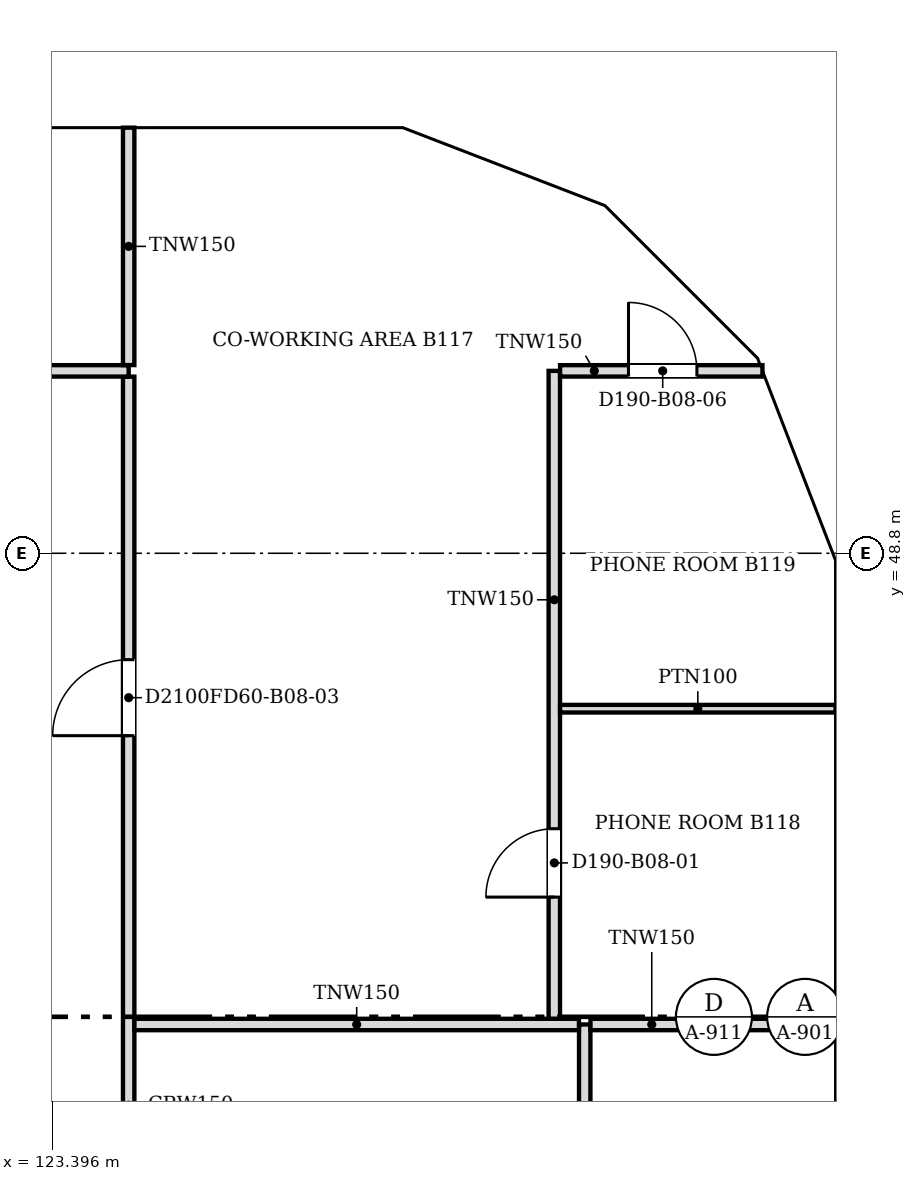
"""IFC4 building model, lengths in metres.
Left out: names, types, materials, properties, quantities, classifications, styles, units other than length and angle.
Written with IfcOpenShell. Run it as: python <this file> out.ifc"""

import sys

from ifc_helpers import new_model, si_unit, direction, frame, frame_2d, origin, place, context, subcontext, project, spatial, polyline, rectangle, outline, extrude, faceted_brep, source, transform, mapped, element, fill, save


model = new_model("IFC4")
c1 = context("Model", 3, precision=1e-05, world=origin(), true_north=direction((0.0, 1.0)))
c2 = subcontext(c1, "Body", "Model", "MODEL_VIEW")
j1 = project(units=[si_unit("LENGTHUNIT", "METRE"), si_unit("PLANEANGLEUNIT", "RADIAN")], contexts=[c1])
p1 = place(None, origin())
s1 = spatial("IfcSite", under=j1, at=p1, CompositionType="ELEMENT")
p2 = place(p1, origin())
s2 = spatial("IfcBuilding", under=s1, at=p2, CompositionType="ELEMENT")
p3 = place(p2, frame((0.0, 0.0, 80.0)))
s3 = spatial("IfcBuildingStorey", under=s2, at=p3, CompositionType="ELEMENT", Elevation=80.0)
m1 = source(origin(), c2, "Body", "SweptSolid", [
    extrude(outline(polyline([(3.05, 0.0), (6.1, 3.8), (3.05, 7.6), (0.0, 3.8), (3.05, 0.0)])), frame((0.0, 0.25, 0.0), z_axis=(0.0, -1.0, 0.0), x_axis=(1.0, 0.0, 0.0)), (0.0, 0.0, 1.0), 0.5),
])
p4 = place(p3, frame((133.95, 39.65, -3.8), z_axis=(0.0, 0.0, 1.0), x_axis=(0.0, 1.0, 0.0)))
e1 = element("IfcWall", 1, at=p4, inside=s3, PredefinedType="SOLIDWALL", context=c2, shape_type="MappedRepresentation", body=[
    mapped(m1, transform((0.0, 0.0, 0.0), scale=1.0)),
])
m2 = source(origin(), c2, "Body", "SweptSolid", [
    extrude(outline(polyline([(3.05, 0.399), (5.78, 3.8), (3.05, 7.201), (0.321, 3.8), (3.05, 0.399)])), frame((0.0, 0.26, 0.0), z_axis=(0.0, -1.0, 0.0), x_axis=(1.0, 0.0, 0.0)), (0.0, 0.0, 1.0), 0.52),
])
p5 = place(p4, origin())
e2 = element("IfcOpeningElement", 2, at=p5, cuts=e1, PredefinedType="OPENING", context=c2, shape_type="MappedRepresentation", body=[
    mapped(m2, transform((0.0, 0.0, 0.0), scale=1.0)),
])
m3 = source(origin(), c2, "Body", "Brep", [
    faceted_brep([(3.003, -0.25, 0.0), (3.05, -0.25, 0.06), (3.05, -0.25, 7.54), (3.003, -0.25, 7.6), (0.0, -0.25, 3.8), (0.0, 0.25, 3.8), (2.957, 0.25, 7.541), (2.957, 0.25, 0.059), (3.003, 0.0, 0.0), (3.003, 0.0, 7.6)], [[[0, 1, 2, 3, 4]], [[5, 6, 7]], [[1, 0, 8]], [[9, 3, 2]], [[6, 5, 4, 3, 9]], [[5, 7, 8, 0, 4]], [[1, 8, 7, 6, 9, 2]]]),
])
p6 = place(p3, frame((133.95, 45.75, -3.8), z_axis=(0.0, 0.0, 1.0), x_axis=(0.0, 1.0, 0.0)))
e3 = element("IfcWall", 3, at=p6, inside=s3, PredefinedType="SOLIDWALL", context=c2, shape_type="MappedRepresentation", body=[
    mapped(m3, transform((0.0, 0.0, 0.0), scale=1.0)),
])
m4 = source(origin(), c2, "Body", "SweptSolid", [
    extrude(outline(polyline([(2.803, 6.944), (0.319, 3.8), (2.803, 0.656), (2.803, 6.944)])), frame((0.0, 0.26, 0.0), z_axis=(0.0, -1.0, 0.0), x_axis=(1.0, 0.0, 0.0)), (0.0, 0.0, 1.0), 0.52),
])
p7 = place(p6, origin())
e4 = element("IfcOpeningElement", 4, at=p7, cuts=e3, PredefinedType="OPENING", context=c2, shape_type="MappedRepresentation", body=[
    mapped(m4, transform((0.0, 0.0, 0.0), scale=1.0)),
])
m5 = source(origin(), c2, "Body", "Brep", [
    faceted_brep([(0.047, -0.25, 0.0), (2.997, -0.25, 3.8), (0.047, -0.25, 7.6), (0.0, -0.25, 7.541), (0.0, -0.25, 0.059), (0.093, 0.25, 7.54), (2.944, 0.25, 3.868), (2.944, 0.25, 3.732), (0.093, 0.25, 0.06), (2.997, 0.0, 3.8), (0.047, 0.0, 0.0), (0.047, 0.0, 7.6)], [[[0, 1, 2, 3, 4]], [[5, 6, 7, 8]], [[8, 7, 9, 1, 0, 10]], [[6, 5, 11, 2, 1, 9]], [[3, 2, 11]], [[10, 0, 4]], [[8, 10, 4, 3, 11, 5]], [[9, 7, 6]]]),
])
p8 = place(p3, frame((133.967, 48.71, -3.8), z_axis=(0.0, 0.0, 1.0), x_axis=(-0.359901446078, 0.932990326376, 0.0)))
e5 = element("IfcWall", 5, at=p8, inside=s3, PredefinedType="SOLIDWALL", context=c2, shape_type="MappedRepresentation", body=[
    mapped(m5, transform((0.0, 0.0, 0.0), scale=1.0)),
])
m6 = source(origin(), c2, "Body", "SweptSolid", [
    extrude(outline(polyline([(0.247, 0.665), (2.681, 3.8), (0.247, 6.935), (0.247, 0.665)])), frame((0.0, 0.26, 0.0), z_axis=(0.0, -1.0, 0.0), x_axis=(1.0, 0.0, 0.0)), (0.0, 0.0, 1.0), 0.52),
])
p9 = place(p8, origin())
e6 = element("IfcOpeningElement", 6, at=p9, cuts=e5, PredefinedType="OPENING", context=c2, shape_type="MappedRepresentation", body=[
    mapped(m6, transform((0.0, 0.0, 0.0), scale=1.0)),
])
m7 = source(origin(), c2, "Body", "Brep", [
    faceted_brep([(2.944, -0.25, 0.0), (2.997, -0.25, 0.068), (2.997, -0.25, 7.532), (2.944, -0.25, 7.6), (0.0, -0.25, 3.8), (0.053, 0.25, 3.868), (2.891, 0.25, 7.532), (2.891, 0.25, 0.068), (0.053, 0.25, 3.732), (2.944, 0.0, 0.0), (2.944, 0.0, 7.6), (0.0, 0.0, 3.8)], [[[0, 1, 2, 3, 4]], [[5, 6, 7, 8]], [[1, 0, 9]], [[10, 3, 2]], [[6, 5, 11, 4, 3, 10]], [[8, 7, 9, 0, 4, 11]], [[8, 11, 5]], [[1, 9, 7, 6, 10, 2]]]),
])
p10 = place(p3, frame((132.888, 51.506, -3.8), z_axis=(0.0, 0.0, 1.0), x_axis=(-0.707147509625, 0.707066050402, 0.0)))
e7 = element("IfcWall", 7, at=p10, inside=s3, PredefinedType="SOLIDWALL", context=c2, shape_type="MappedRepresentation", body=[
    mapped(m7, transform((0.0, 0.0, 0.0), scale=1.0)),
])
m8 = source(origin(), c2, "Body", "SweptSolid", [
    extrude(outline(polyline([(2.744, 6.934), (0.316, 3.8), (2.744, 0.666), (2.744, 6.934)])), frame((0.0, 0.26, 0.0), z_axis=(0.0, -1.0, 0.0), x_axis=(1.0, 0.0, 0.0)), (0.0, 0.0, 1.0), 0.52),
])
p11 = place(p10, origin())
e8 = element("IfcOpeningElement", 8, at=p11, cuts=e7, PredefinedType="OPENING", context=c2, shape_type="MappedRepresentation", body=[
    mapped(m8, transform((0.0, 0.0, 0.0), scale=1.0)),
])
m9 = source(origin(), c2, "Body", "Brep", [
    faceted_brep([(0.053, -0.25, 0.0), (3.003, -0.25, 3.8), (0.053, -0.25, 7.6), (0.0, -0.25, 7.532), (0.0, -0.25, 0.068), (0.106, 0.25, 7.532), (2.957, 0.25, 3.86), (2.957, 0.25, 3.74), (0.106, 0.25, 0.068), (3.003, 0.0, 3.8), (0.053, 0.0, 0.0), (0.053, 0.0, 7.6)], [[[0, 1, 2, 3, 4]], [[5, 6, 7, 8]], [[8, 7, 9, 1, 0, 10]], [[6, 5, 11, 2, 1, 9]], [[3, 2, 11]], [[10, 0, 4]], [[8, 10, 4, 3, 11, 5]], [[9, 7, 6]]]),
])
p12 = place(p3, frame((130.856, 53.569, -3.8), z_axis=(0.0, 0.0, 1.0), x_axis=(-0.933007896601, 0.359855894603, 0.0)))
e9 = element("IfcWall", 9, at=p12, inside=s3, PredefinedType="SOLIDWALL", context=c2, shape_type="MappedRepresentation", body=[
    mapped(m9, transform((0.0, 0.0, 0.0), scale=1.0)),
])
m10 = source(origin(), c2, "Body", "SweptSolid", [
    extrude(outline(polyline([(0.253, 0.665), (2.687, 3.8), (0.253, 6.935), (0.253, 0.665)])), frame((0.0, 0.26, 0.0), z_axis=(0.0, -1.0, 0.0), x_axis=(1.0, 0.0, 0.0)), (0.0, 0.0, 1.0), 0.52),
])
p13 = place(p12, origin())
e10 = element("IfcOpeningElement", 10, at=p13, cuts=e9, PredefinedType="OPENING", context=c2, shape_type="MappedRepresentation", body=[
    mapped(m10, transform((0.0, 0.0, 0.0), scale=1.0)),
])
m11 = source(origin(), c2, "Body", "Brep", [
    faceted_brep([(3.003, -0.25, 0.0), (6.053, -0.25, 3.8), (3.003, -0.25, 7.6), (0.0, -0.25, 3.8), (0.047, 0.25, 3.859), (3.003, 0.25, 7.6), (6.053, 0.25, 3.8), (3.003, 0.25, 0.0), (0.047, 0.25, 3.741), (0.0, 0.0, 3.8)], [[[0, 1, 2, 3]], [[4, 5, 6, 7, 8]], [[7, 6, 1, 0]], [[6, 5, 2, 1]], [[5, 4, 9, 3, 2]], [[8, 7, 0, 3, 9]], [[8, 9, 4]]]),
])
p14 = place(p3, frame((128.053, 54.65, -3.8), z_axis=(0.0, 0.0, 1.0), x_axis=(-1.0, 0.0, 0.0)))
e11 = element("IfcWall", 11, at=p14, inside=s3, PredefinedType="SOLIDWALL", context=c2, shape_type="MappedRepresentation", body=[
    mapped(m11, transform((0.0, 0.0, 0.0), scale=1.0)),
])
m12 = source(origin(), c2, "Body", "SweptSolid", [
    extrude(outline(polyline([(3.005, 0.401), (5.733, 3.8), (3.005, 7.199), (0.319, 3.8), (3.005, 0.401)])), frame((0.0, 0.26, 0.0), z_axis=(0.0, -1.0, 0.0), x_axis=(1.0, 0.0, 0.0)), (0.0, 0.0, 1.0), 0.52),
])
p15 = place(p14, origin())
e12 = element("IfcOpeningElement", 12, at=p15, cuts=e11, PredefinedType="OPENING", context=c2, shape_type="MappedRepresentation", body=[
    mapped(m12, transform((0.0, 0.0, 0.0), scale=1.0)),
])
p16 = place(p2, frame((0.0, 0.0, 83.8)))
s4 = spatial("IfcBuildingStorey", under=s2, at=p16, CompositionType="ELEMENT", Elevation=83.8)
m13 = source(origin(), c2, "Body", "Brep", [
    faceted_brep([(3.05, -0.25, 0.0), (6.1, -0.25, 3.8), (6.1, -0.25, 3.8), (3.05, -0.25, 7.6), (0.0, -0.25, 3.8), (0.0, 0.25, 3.8), (3.05, 0.25, 7.6), (6.1, 0.25, 3.8), (6.1, 0.25, 3.8), (3.05, 0.25, 0.0)], [[[0, 1, 2, 3, 4]], [[5, 6, 7, 8, 9]], [[9, 8, 1, 0]], [[7, 6, 3, 2]], [[6, 5, 4, 3]], [[5, 9, 0, 4]], [[1, 8, 7, 2]]]),
])
p17 = place(p16, frame((133.95, 36.6, -3.8), z_axis=(0.0, 0.0, 1.0), x_axis=(0.0, 1.0, 0.0)))
e13 = element("IfcWall", 13, at=p17, inside=s4, PredefinedType="SOLIDWALL", context=c2, shape_type="MappedRepresentation", body=[
    mapped(m13, transform((0.0, 0.0, 0.0), scale=1.0)),
])
p18 = place(p17, origin())
e14 = element("IfcOpeningElement", 14, at=p18, cuts=e13, PredefinedType="OPENING", context=c2, shape_type="MappedRepresentation", body=[
    mapped(m2, transform((0.0, 0.0, 0.0), scale=1.0)),
])
m14 = source(origin(), c2, "Body", "Brep", [
    faceted_brep([(3.05, -0.25, 0.0), (6.053, -0.25, 3.8), (3.05, -0.25, 7.6), (0.0, -0.25, 3.8), (0.0, 0.25, 3.8), (3.05, 0.25, 7.6), (6.007, 0.25, 3.859), (6.007, 0.25, 3.741), (3.05, 0.25, 0.0), (6.053, 0.0, 3.8)], [[[0, 1, 2, 3]], [[4, 5, 6, 7, 8]], [[8, 7, 9, 1, 0]], [[6, 5, 2, 1, 9]], [[5, 4, 3, 2]], [[4, 8, 0, 3]], [[9, 7, 6]]]),
])
p19 = place(p16, frame((133.95, 42.7, -3.8), z_axis=(0.0, 0.0, 1.0), x_axis=(0.0, 1.0, 0.0)))
e15 = element("IfcWall", 15, at=p19, inside=s4, PredefinedType="SOLIDWALL", context=c2, shape_type="MappedRepresentation", body=[
    mapped(m14, transform((0.0, 0.0, 0.0), scale=1.0)),
])
m15 = source(origin(), c2, "Body", "SweptSolid", [
    extrude(outline(polyline([(3.049, 0.401), (5.735, 3.8), (3.049, 7.199), (0.321, 3.8), (3.049, 0.401)])), frame((0.0, 0.26, 0.0), z_axis=(0.0, -1.0, 0.0), x_axis=(1.0, 0.0, 0.0)), (0.0, 0.0, 1.0), 0.52),
])
p20 = place(p19, origin())
e16 = element("IfcOpeningElement", 16, at=p20, cuts=e15, PredefinedType="OPENING", context=c2, shape_type="MappedRepresentation", body=[
    mapped(m15, transform((0.0, 0.0, 0.0), scale=1.0)),
])
m16 = source(origin(), c2, "Body", "Brep", [
    faceted_brep([(2.95, -0.25, 0.0), (3.003, -0.25, 0.068), (3.003, -0.25, 7.532), (2.95, -0.25, 7.6), (0.0, -0.25, 3.8), (0.047, 0.25, 3.86), (2.898, 0.25, 7.532), (2.898, 0.25, 0.068), (0.047, 0.25, 3.74), (2.95, 0.0, 0.0), (2.95, 0.0, 7.6), (0.0, 0.0, 3.8)], [[[0, 1, 2, 3, 4]], [[5, 6, 7, 8]], [[1, 0, 9]], [[10, 3, 2]], [[6, 5, 11, 4, 3, 10]], [[8, 7, 9, 0, 4, 11]], [[8, 11, 5]], [[1, 9, 7, 6, 10, 2]]]),
])
p21 = place(p16, frame((133.95, 48.753, -3.8), z_axis=(0.0, 0.0, 1.0), x_axis=(-0.359855894603, 0.933007896601, 0.0)))
e17 = element("IfcWall", 17, at=p21, inside=s4, PredefinedType="SOLIDWALL", context=c2, shape_type="MappedRepresentation", body=[
    mapped(m16, transform((0.0, 0.0, 0.0), scale=1.0)),
])
m17 = source(origin(), c2, "Body", "SweptSolid", [
    extrude(outline(polyline([(2.75, 6.935), (0.316, 3.8), (2.75, 0.665), (2.75, 6.935)])), frame((0.0, 0.26, 0.0), z_axis=(0.0, -1.0, 0.0), x_axis=(1.0, 0.0, 0.0)), (0.0, 0.0, 1.0), 0.52),
])
p22 = place(p21, origin())
e18 = element("IfcOpeningElement", 18, at=p22, cuts=e17, PredefinedType="OPENING", context=c2, shape_type="MappedRepresentation", body=[
    mapped(m17, transform((0.0, 0.0, 0.0), scale=1.0)),
])
m18 = source(origin(), c2, "Body", "Brep", [
    faceted_brep([(0.053, -0.25, 0.0), (2.997, -0.25, 3.8), (0.053, -0.25, 7.6), (0.0, -0.25, 7.532), (0.0, -0.25, 0.068), (0.106, 0.25, 7.532), (2.944, 0.25, 3.868), (2.944, 0.25, 3.732), (0.106, 0.25, 0.068), (2.997, 0.0, 3.8), (0.053, 0.0, 0.0), (0.053, 0.0, 7.6)], [[[0, 1, 2, 3, 4]], [[5, 6, 7, 8]], [[8, 7, 9, 1, 0, 10]], [[6, 5, 11, 2, 1, 9]], [[3, 2, 11]], [[10, 0, 4]], [[8, 10, 4, 3, 11, 5]], [[9, 7, 6]]]),
])
p23 = place(p16, frame((132.926, 51.469, -3.8), z_axis=(0.0, 0.0, 1.0), x_axis=(-0.707066050402, 0.707147509625, 0.0)))
e19 = element("IfcWall", 19, at=p23, inside=s4, PredefinedType="SOLIDWALL", context=c2, shape_type="MappedRepresentation", body=[
    mapped(m18, transform((0.0, 0.0, 0.0), scale=1.0)),
])
m19 = source(origin(), c2, "Body", "SweptSolid", [
    extrude(outline(polyline([(0.253, 0.666), (2.681, 3.8), (0.253, 6.934), (0.253, 0.666)])), frame((0.0, 0.26, 0.0), z_axis=(0.0, -1.0, 0.0), x_axis=(1.0, 0.0, 0.0)), (0.0, 0.0, 1.0), 0.52),
])
p24 = place(p23, origin())
e20 = element("IfcOpeningElement", 20, at=p24, cuts=e19, PredefinedType="OPENING", context=c2, shape_type="MappedRepresentation", body=[
    mapped(m19, transform((0.0, 0.0, 0.0), scale=1.0)),
])
m20 = source(origin(), c2, "Body", "Brep", [
    faceted_brep([(2.95, -0.25, 0.0), (2.997, -0.25, 0.059), (2.997, -0.25, 7.541), (2.95, -0.25, 7.6), (0.0, -0.25, 3.8), (0.053, 0.25, 3.868), (2.904, 0.25, 7.54), (2.904, 0.25, 0.06), (0.053, 0.25, 3.732), (2.95, 0.0, 0.0), (2.95, 0.0, 7.6), (0.0, 0.0, 3.8)], [[[0, 1, 2, 3, 4]], [[5, 6, 7, 8]], [[1, 0, 9]], [[10, 3, 2]], [[6, 5, 11, 4, 3, 10]], [[8, 7, 9, 0, 4, 11]], [[8, 11, 5]], [[1, 9, 7, 6, 10, 2]]]),
])
p25 = place(p16, frame((130.806, 53.588, -3.8), z_axis=(0.0, 0.0, 1.0), x_axis=(-0.932990326376, 0.359901446078, 0.0)))
e21 = element("IfcWall", 21, at=p25, inside=s4, PredefinedType="SOLIDWALL", context=c2, shape_type="MappedRepresentation", body=[
    mapped(m20, transform((0.0, 0.0, 0.0), scale=1.0)),
])
p26 = place(p25, origin())
e22 = element("IfcOpeningElement", 22, at=p26, cuts=e21, PredefinedType="OPENING", context=c2, shape_type="MappedRepresentation", body=[
    mapped(m17, transform((0.0, 0.0, 0.0), scale=1.0)),
])
m21 = source(origin(), c2, "Body", "Brep", [
    faceted_brep([(0.047, -0.25, 0.0), (3.05, -0.25, 3.8), (0.047, -0.25, 7.6), (0.0, -0.25, 7.54), (0.0, -0.25, 0.06), (0.093, 0.25, 7.541), (3.05, 0.25, 3.8), (0.093, 0.25, 0.059), (0.047, 0.0, 0.0), (0.047, 0.0, 7.6)], [[[0, 1, 2, 3, 4]], [[5, 6, 7]], [[7, 6, 1, 0, 8]], [[6, 5, 9, 2, 1]], [[3, 2, 9]], [[8, 0, 4]], [[7, 8, 4, 3, 9, 5]]]),
])
p27 = place(p16, frame((128.1, 54.65, -3.8), z_axis=(0.0, 0.0, 1.0), x_axis=(-1.0, 0.0, 0.0)))
e23 = element("IfcWall", 23, at=p27, inside=s4, PredefinedType="SOLIDWALL", context=c2, shape_type="MappedRepresentation", body=[
    mapped(m21, transform((0.0, 0.0, 0.0), scale=1.0)),
])
m22 = source(origin(), c2, "Body", "SweptSolid", [
    extrude(outline(polyline([(0.247, 0.656), (2.731, 3.8), (0.247, 6.944), (0.247, 0.656)])), frame((0.0, 0.26, 0.0), z_axis=(0.0, -1.0, 0.0), x_axis=(1.0, 0.0, 0.0)), (0.0, 0.0, 1.0), 0.52),
])
p28 = place(p27, origin())
e24 = element("IfcOpeningElement", 24, at=p28, cuts=e23, PredefinedType="OPENING", context=c2, shape_type="MappedRepresentation", body=[
    mapped(m22, transform((0.0, 0.0, 0.0), scale=1.0)),
])
p29 = place(p16, frame((125.05, 54.65, -3.8), z_axis=(0.0, 0.0, 1.0), x_axis=(-1.0, 0.0, 0.0)))
e25 = element("IfcWall", 25, at=p29, inside=s4, PredefinedType="SOLIDWALL", context=c2, shape_type="MappedRepresentation", body=[
    mapped(m1, transform((0.0, 0.0, 0.0), scale=1.0)),
])
p30 = place(p29, origin())
e26 = element("IfcOpeningElement", 26, at=p30, cuts=e25, PredefinedType="OPENING", context=c2, shape_type="MappedRepresentation", body=[
    mapped(m2, transform((0.0, 0.0, 0.0), scale=1.0)),
])
p31 = place(p3, frame((124.4, 51.124, 0.0), z_axis=(0.0, 0.0, 1.0), x_axis=(0.0, -1.0, 0.0)))
e27 = element("IfcWall", 27, at=p31, inside=s3, PredefinedType="PARTITIONING", context=c2, shape_type="SweptSolid", body=[
    extrude(rectangle(XDim=14.448, YDim=0.15, at=frame_2d((7.224, 0.0))), origin(), (0.0, 0.0, 1.0), 3.067),
])
m23 = source(origin(), c2, "Body", "SweptSolid", [
    extrude(rectangle(XDim=1.0, YDim=2.1, at=frame_2d((0.5, 1.05))), frame((0.0, 0.085, 0.0), z_axis=(0.0, -1.0, 0.0), x_axis=(1.0, 0.0, 0.0)), (0.0, 0.0, 1.0), 0.17),
])
p32 = place(p31, frame((3.724, 0.0, 0.0)))
e28 = element("IfcOpeningElement", 28, at=p32, cuts=e27, PredefinedType="OPENING", context=c2, shape_type="MappedRepresentation", body=[
    mapped(m23, transform((0.0, 0.0, 0.0), scale=1.0)),
])
p33 = place(p3, frame((130.4, 42.6, 0.0), z_axis=(0.0, 0.0, 1.0), x_axis=(0.0, -1.0, 0.0)))
e29 = element("IfcWall", 29, at=p33, inside=s3, PredefinedType="PARTITIONING", context=c2, shape_type="SweptSolid", body=[
    extrude(rectangle(XDim=5.924, YDim=0.15, at=frame_2d((2.962, 0.0))), origin(), (0.0, 0.0, 1.0), 3.067),
])
m24 = source(origin(), c2, "Body", "SweptSolid", [
    extrude(rectangle(XDim=0.9, YDim=2.1, at=frame_2d((0.45, 1.05))), frame((0.0, 0.085, 0.0), z_axis=(0.0, -1.0, 0.0), x_axis=(1.0, 0.0, 0.0)), (0.0, 0.0, 1.0), 0.17),
])
p34 = place(p33, frame((2.524, 0.0, 0.0)))
e30 = element("IfcOpeningElement", 30, at=p34, cuts=e29, PredefinedType="OPENING", context=c2, shape_type="MappedRepresentation", body=[
    mapped(m24, transform((0.0, 0.0, 0.0), scale=1.0)),
])
p35 = place(p3, frame((124.476, 42.6, 0.0), z_axis=(0.0, 0.0, 1.0), x_axis=(1.0, 0.0, 0.0)))
e31 = element("IfcWall", 31, at=p35, inside=s3, PredefinedType="PARTITIONING", context=c2, shape_type="SweptSolid", body=[
    extrude(rectangle(XDim=5.848, YDim=0.15, at=frame_2d((2.924, 0.0))), origin(), (0.0, 0.0, 1.0), 3.067),
])
p36 = place(p3, frame((130.476, 42.6, 0.0), z_axis=(0.0, 0.0, 1.0), x_axis=(1.0, 0.0, 0.0)))
e32 = element("IfcWall", 32, at=p36, inside=s3, PredefinedType="PARTITIONING", context=c2, shape_type="SweptSolid", body=[
    extrude(rectangle(XDim=3.224, YDim=0.15, at=frame_2d((1.612, 0.0))), origin(), (0.0, 0.0, 1.0), 3.067),
])
p37 = place(p3, frame((130.0, 51.2, 0.0), z_axis=(0.0, 0.0, 1.0), x_axis=(0.0, -1.0, 0.0)))
e33 = element("IfcWall", 33, at=p37, inside=s3, PredefinedType="PARTITIONING", context=c2, shape_type="SweptSolid", body=[
    extrude(rectangle(XDim=8.524, YDim=0.15, at=frame_2d((4.262, 0.0))), origin(), (0.0, 0.0, 1.0), 3.067),
])
p38 = place(p37, frame((6.024, 0.0, 0.0)))
e34 = element("IfcOpeningElement", 34, at=p38, cuts=e33, PredefinedType="OPENING", context=c2, shape_type="MappedRepresentation", body=[
    mapped(m24, transform((0.0, 0.0, 0.0), scale=1.0)),
])
p39 = place(p3, frame((130.076, 46.755, 0.0), z_axis=(0.0, 0.0, 1.0), x_axis=(1.0, 0.0, 0.0)))
e35 = element("IfcWall", 35, at=p39, inside=s3, PredefinedType="PARTITIONING", context=c2, shape_type="SweptSolid", body=[
    extrude(rectangle(XDim=3.624, YDim=0.1, at=frame_2d((1.812, 0.0))), origin(), (0.0, 0.0, 1.0), 3.067),
])
p40 = place(p3, frame((108.5, 51.2, 0.0), z_axis=(0.0, 0.0, 1.0), x_axis=(1.0, 0.0, 0.0)))
e36 = element("IfcWall", 36, at=p40, inside=s3, PredefinedType="PARTITIONING", context=c2, shape_type="SweptSolid", body=[
    extrude(rectangle(XDim=15.9, YDim=0.15, at=frame_2d((7.95, 0.0))), origin(), (0.0, 0.0, 1.0), 3.067),
])
p41 = place(p40, frame((8.3, 0.0, 0.0)))
e37 = element("IfcOpeningElement", 37, at=p41, cuts=e36, PredefinedType="OPENING", context=c2, shape_type="MappedRepresentation", body=[
    mapped(m24, transform((0.0, 0.0, 0.0), scale=1.0)),
])
p42 = place(p3, frame((132.738, 51.2, 0.0), z_axis=(0.0, 0.0, 1.0), x_axis=(-1.0, 0.0, 0.0)))
e38 = element("IfcWall", 38, at=p42, inside=s3, PredefinedType="PARTITIONING", context=c2, shape_type="SweptSolid", body=[
    extrude(rectangle(XDim=2.662, YDim=0.15, at=frame_2d((1.331, 0.0))), origin(), (0.0, 0.0, 1.0), 3.067),
])
p43 = place(p42, frame((0.862, 0.0, 0.0)))
e39 = element("IfcOpeningElement", 39, at=p43, cuts=e38, PredefinedType="OPENING", context=c2, shape_type="MappedRepresentation", body=[
    mapped(m24, transform((0.0, 0.0, 0.0), scale=1.0)),
])
p44 = place(p3, frame((124.4, 51.276, 0.0), z_axis=(0.0, 0.0, 1.0), x_axis=(0.0, 1.0, 0.0)))
e40 = element("IfcWall", 40, at=p44, inside=s3, PredefinedType="PARTITIONING", context=c2, shape_type="SweptSolid", body=[
    extrude(rectangle(XDim=3.124, YDim=0.15, at=frame_2d((1.562, 0.0))), origin(), (0.0, 0.0, 1.0), 3.067),
])
m25 = source(origin(), c2, "Body", "SweptSolid", [
    extrude(rectangle(XDim=0.9, YDim=2.1, at=frame_2d((0.45, 1.05))), frame((0.0, 0.025, 0.0), z_axis=(0.0, -1.0, 0.0), x_axis=(1.0, 0.0, 0.0)), (0.0, 0.0, 1.0), 0.05),
])
p45 = place(p38, origin())
e41 = element("IfcDoor", 41, at=p45, inside=s3, OperationType="SINGLE_SWING_RIGHT", PredefinedType="DOOR", context=c2, shape_type="MappedRepresentation", body=[
    mapped(m25, transform((0.0, 0.0, 0.0), scale=1.0)),
])
fill(e34, e41)
p46 = place(p43, origin())
e42 = element("IfcDoor", 42, at=p46, inside=s3, OperationType="SINGLE_SWING_RIGHT", PredefinedType="DOOR", context=c2, shape_type="MappedRepresentation", body=[
    mapped(m25, transform((0.0, 0.0, 0.0), scale=1.0)),
])
fill(e39, e42)
m26 = source(origin(), c2, "Body", "SweptSolid", [
    extrude(rectangle(XDim=1.0, YDim=2.1, at=frame_2d((0.5, 1.05))), frame((0.0, 0.025, 0.0), z_axis=(0.0, -1.0, 0.0), x_axis=(1.0, 0.0, 0.0)), (0.0, 0.0, 1.0), 0.05),
])
p47 = place(p32, origin())
e43 = element("IfcDoor", 43, at=p47, inside=s3, OperationType="SINGLE_SWING_RIGHT", PredefinedType="DOOR", context=c2, shape_type="MappedRepresentation", body=[
    mapped(m26, transform((0.0, 0.0, 0.0), scale=1.0)),
])
fill(e28, e43)
save(model, sys.argv[1])
